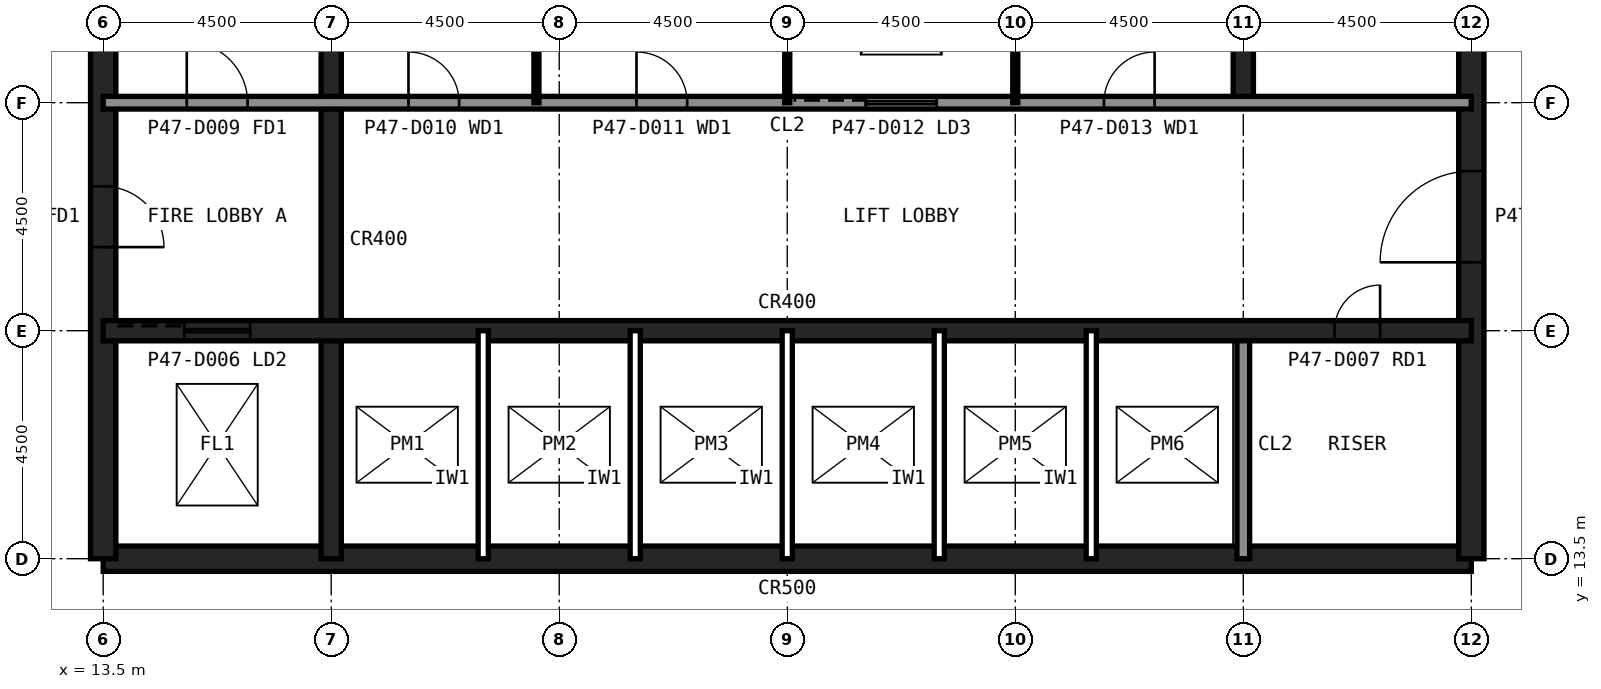
"""IFC4 building model, lengths in metres.
Left out: names, types, materials, properties, quantities, classifications, styles, units other than length and angle.
Written with IfcOpenShell. Run it as: python <this file> out.ifc"""

import sys

from ifc_helpers import new_model, si_unit, direction, frame, frame_2d, origin, place, context, subcontext, project, spatial, rectangle, extrude, element, fill, save


model = new_model("IFC4")
c1 = context("Model", 3, precision=1e-05, world=origin(), true_north=direction((0.0, 1.0)))
c2 = subcontext(c1, "Body", "Model", "MODEL_VIEW")
j1 = project(units=[si_unit("LENGTHUNIT", "METRE"), si_unit("PLANEANGLEUNIT", "RADIAN")], contexts=[c1])
p1 = place(None, origin())
s1 = spatial("IfcSite", under=j1, at=p1, CompositionType="ELEMENT")
p2 = place(p1, origin())
s2 = spatial("IfcBuilding", under=s1, at=p2, CompositionType="ELEMENT")
p3 = place(p2, frame((0.0, 0.0, 199.6)))
s3 = spatial("IfcBuildingStorey", under=s2, at=p3, CompositionType="ELEMENT", Elevation=199.6)
p4 = place(p3, frame((13.5, 13.5, 0.0), z_axis=(0.0, 0.0, 1.0), x_axis=(1.0, 0.0, 0.0)))
e1 = element("IfcWall", 1, at=p4, inside=s3, PredefinedType="SHEAR", context=c2, shape_type="SweptSolid", body=[
    extrude(rectangle(XDim=27.0, YDim=0.5, at=frame_2d((13.5, 0.0))), origin(), (0.0, 0.0, 1.0), 6.0),
])
p5 = place(p3, frame((40.5, 13.5, 0.0), z_axis=(0.0, 0.0, 1.0), x_axis=(0.0, 1.0, 0.0)))
e2 = element("IfcWall", 2, at=p5, inside=s3, PredefinedType="SHEAR", context=c2, shape_type="SweptSolid", body=[
    extrude(rectangle(XDim=27.0, YDim=0.5, at=frame_2d((13.5, 0.0))), origin(), (0.0, 0.0, 1.0), 6.0),
])
p6 = place(p5, frame((5.85, 0.0, 0.0)))
e3 = element("IfcOpeningElement", 3, at=p6, cuts=e2, PredefinedType="OPENING", context=c2, shape_type="SweptSolid", body=[
    extrude(rectangle(XDim=1.8, YDim=2.1, at=frame_2d((0.9, 1.05))), frame((0.0, 0.26, 0.0), z_axis=(0.0, -1.0, 0.0), x_axis=(1.0, 0.0, 0.0)), (0.0, 0.0, 1.0), 0.52),
])
p7 = place(p5, frame((19.65, 0.0, 0.0)))
e4 = element("IfcOpeningElement", 4, at=p7, cuts=e2, PredefinedType="OPENING", context=c2, shape_type="SweptSolid", body=[
    extrude(rectangle(XDim=1.2, YDim=2.1, at=frame_2d((0.6, 1.05))), frame((0.0, 0.26, 0.0), z_axis=(0.0, -1.0, 0.0), x_axis=(1.0, 0.0, 0.0)), (0.0, 0.0, 1.0), 0.52),
])
p8 = place(p3, frame((13.5, 40.5, 0.0), z_axis=(0.0, 0.0, 1.0), x_axis=(0.0, -1.0, 0.0)))
e5 = element("IfcWall", 5, at=p8, inside=s3, PredefinedType="SHEAR", context=c2, shape_type="SweptSolid", body=[
    extrude(rectangle(XDim=27.0, YDim=0.5, at=frame_2d((13.5, 0.0))), origin(), (0.0, 0.0, 1.0), 6.0),
])
p9 = place(p8, frame((19.65, 0.0, 0.0)))
e6 = element("IfcOpeningElement", 6, at=p9, cuts=e5, PredefinedType="OPENING", context=c2, shape_type="SweptSolid", body=[
    extrude(rectangle(XDim=1.2, YDim=2.1, at=frame_2d((0.6, 1.05))), frame((0.0, 0.26, 0.0), z_axis=(0.0, -1.0, 0.0), x_axis=(1.0, 0.0, 0.0)), (0.0, 0.0, 1.0), 0.52),
])
p10 = place(p8, frame((5.85, 0.0, 0.0)))
e7 = element("IfcOpeningElement", 7, at=p10, cuts=e5, PredefinedType="OPENING", context=c2, shape_type="SweptSolid", body=[
    extrude(rectangle(XDim=1.8, YDim=2.1, at=frame_2d((0.9, 1.05))), frame((0.0, 0.26, 0.0), z_axis=(0.0, -1.0, 0.0), x_axis=(1.0, 0.0, 0.0)), (0.0, 0.0, 1.0), 0.52),
])
p11 = place(p3, frame((18.0, 13.5, 0.0), z_axis=(0.0, 0.0, 1.0), x_axis=(0.0, 1.0, 0.0)))
e8 = element("IfcWall", 8, at=p11, inside=s3, PredefinedType="SHEAR", context=c2, shape_type="SweptSolid", body=[
    extrude(rectangle(XDim=18.0, YDim=0.4, at=frame_2d((9.0, 0.0))), origin(), (0.0, 0.0, 1.0), 6.0),
])
p12 = place(p3, frame((36.0, 13.5, 0.0), z_axis=(0.0, 0.0, 1.0), x_axis=(0.0, 1.0, 0.0)))
e9 = element("IfcWall", 9, at=p12, inside=s3, PredefinedType="SOLIDWALL", context=c2, shape_type="SweptSolid", body=[
    extrude(rectangle(XDim=4.5, YDim=0.25, at=frame_2d((2.25, 0.0))), origin(), (0.0, 0.0, 1.0), 5.82),
])
p13 = place(p3, frame((36.0, 22.5, 0.0), z_axis=(0.0, 0.0, 1.0), x_axis=(0.0, 1.0, 0.0)))
e10 = element("IfcWall", 10, at=p13, inside=s3, PredefinedType="SHEAR", context=c2, shape_type="SweptSolid", body=[
    extrude(rectangle(XDim=18.0, YDim=0.4, at=frame_2d((9.0, 0.0))), origin(), (0.0, 0.0, 1.0), 6.0),
])
p14 = place(p3, frame((13.5, 18.0, 0.0), z_axis=(0.0, 0.0, 1.0), x_axis=(1.0, 0.0, 0.0)))
e11 = element("IfcWall", 11, at=p14, inside=s3, PredefinedType="SHEAR", context=c2, shape_type="SweptSolid", body=[
    extrude(rectangle(XDim=27.0, YDim=0.4, at=frame_2d((13.5, 0.0))), origin(), (0.0, 0.0, 1.0), 6.0),
])
p15 = place(p14, frame((24.3, 0.0, 0.0)))
e12 = element("IfcOpeningElement", 12, at=p15, cuts=e11, PredefinedType="OPENING", context=c2, shape_type="SweptSolid", body=[
    extrude(rectangle(XDim=0.9, YDim=2.1, at=frame_2d((0.45, 1.05))), frame((0.0, 0.21, 0.0), z_axis=(0.0, -1.0, 0.0), x_axis=(1.0, 0.0, 0.0)), (0.0, 0.0, 1.0), 0.42),
])
p16 = place(p14, frame((1.6, 0.0, 0.0)))
e13 = element("IfcOpeningElement", 13, at=p16, cuts=e11, PredefinedType="OPENING", context=c2, shape_type="SweptSolid", body=[
    extrude(rectangle(XDim=1.3, YDim=2.2, at=frame_2d((0.65, 1.1))), frame((0.0, 0.21, 0.0), z_axis=(0.0, -1.0, 0.0), x_axis=(1.0, 0.0, 0.0)), (0.0, 0.0, 1.0), 0.42),
])
p17 = place(p3, frame((13.5, 22.5, 0.0), z_axis=(0.0, 0.0, 1.0), x_axis=(1.0, 0.0, 0.0)))
e14 = element("IfcWall", 14, at=p17, inside=s3, PredefinedType="SOLIDWALL", context=c2, shape_type="SweptSolid", body=[
    extrude(rectangle(XDim=27.0, YDim=0.25, at=frame_2d((13.5, 0.0))), origin(), (0.0, 0.0, 1.0), 5.82),
])
p18 = place(p17, frame((1.65, 0.0, 0.0)))
e15 = element("IfcOpeningElement", 15, at=p18, cuts=e14, PredefinedType="OPENING", context=c2, shape_type="SweptSolid", body=[
    extrude(rectangle(XDim=1.2, YDim=2.1, at=frame_2d((0.6, 1.05))), frame((0.0, 0.135, 0.0), z_axis=(0.0, -1.0, 0.0), x_axis=(1.0, 0.0, 0.0)), (0.0, 0.0, 1.0), 0.27),
])
p19 = place(p17, frame((6.025, 0.0, 0.0)))
e16 = element("IfcOpeningElement", 16, at=p19, cuts=e14, PredefinedType="OPENING", context=c2, shape_type="SweptSolid", body=[
    extrude(rectangle(XDim=1.0, YDim=2.1, at=frame_2d((0.5, 1.05))), frame((0.0, 0.135, 0.0), z_axis=(0.0, -1.0, 0.0), x_axis=(1.0, 0.0, 0.0)), (0.0, 0.0, 1.0), 0.27),
])
p20 = place(p17, frame((10.525, 0.0, 0.0)))
e17 = element("IfcOpeningElement", 17, at=p20, cuts=e14, PredefinedType="OPENING", context=c2, shape_type="SweptSolid", body=[
    extrude(rectangle(XDim=1.0, YDim=2.1, at=frame_2d((0.5, 1.05))), frame((0.0, 0.135, 0.0), z_axis=(0.0, -1.0, 0.0), x_axis=(1.0, 0.0, 0.0)), (0.0, 0.0, 1.0), 0.27),
])
p21 = place(p17, frame((19.75, 0.0, 0.0)))
e18 = element("IfcOpeningElement", 18, at=p21, cuts=e14, PredefinedType="OPENING", context=c2, shape_type="SweptSolid", body=[
    extrude(rectangle(XDim=1.0, YDim=2.1, at=frame_2d((0.5, 1.05))), frame((0.0, 0.135, 0.0), z_axis=(0.0, -1.0, 0.0), x_axis=(1.0, 0.0, 0.0)), (0.0, 0.0, 1.0), 0.27),
])
p22 = place(p17, frame((15.05, 0.0, 0.0)))
e19 = element("IfcOpeningElement", 19, at=p22, cuts=e14, PredefinedType="OPENING", context=c2, shape_type="SweptSolid", body=[
    extrude(rectangle(XDim=1.4, YDim=2.4, at=frame_2d((0.7, 1.2))), frame((0.0, 0.135, 0.0), z_axis=(0.0, -1.0, 0.0), x_axis=(1.0, 0.0, 0.0)), (0.0, 0.0, 1.0), 0.27),
])
p23 = place(p3, frame((17.739, -0.63, 0.0), z_axis=(0.0, 0.0, 1.0), x_axis=(-0.707106781187, 0.707106781187, 0.0)))
e20 = element("IfcWall", 20, at=p23, inside=s3, PredefinedType="SOLIDWALL", context=c2, shape_type="SweptSolid", body=[
    extrude(rectangle(XDim=25.978, YDim=0.3, at=frame_2d((12.989, 0.0))), origin(), (0.0, 0.0, 1.0), 6.0),
])
p24 = place(p23, frame((0.424, 0.0, 1.2)))
e21 = element("IfcOpeningElement", 21, at=p24, cuts=e20, PredefinedType="OPENING", context=c2, shape_type="SweptSolid", body=[
    extrude(rectangle(XDim=2.4, YDim=3.0, at=frame_2d((1.2, 1.5))), frame((0.0, 0.16, 0.0), z_axis=(0.0, -1.0, 0.0), x_axis=(1.0, 0.0, 0.0)), (0.0, 0.0, 1.0), 0.32),
])
p25 = place(p23, frame((3.671, 0.0, 1.2)))
e22 = element("IfcOpeningElement", 22, at=p25, cuts=e20, PredefinedType="OPENING", context=c2, shape_type="SweptSolid", body=[
    extrude(rectangle(XDim=2.4, YDim=3.0, at=frame_2d((1.2, 1.5))), frame((0.0, 0.16, 0.0), z_axis=(0.0, -1.0, 0.0), x_axis=(1.0, 0.0, 0.0)), (0.0, 0.0, 1.0), 0.32),
])
p26 = place(p23, frame((6.918, 0.0, 1.2)))
e23 = element("IfcOpeningElement", 23, at=p26, cuts=e20, PredefinedType="OPENING", context=c2, shape_type="SweptSolid", body=[
    extrude(rectangle(XDim=2.4, YDim=3.0, at=frame_2d((1.2, 1.5))), frame((0.0, 0.16, 0.0), z_axis=(0.0, -1.0, 0.0), x_axis=(1.0, 0.0, 0.0)), (0.0, 0.0, 1.0), 0.32),
])
p27 = place(p23, frame((10.165, 0.0, 1.2)))
e24 = element("IfcOpeningElement", 24, at=p27, cuts=e20, PredefinedType="OPENING", context=c2, shape_type="SweptSolid", body=[
    extrude(rectangle(XDim=2.4, YDim=3.0, at=frame_2d((1.2, 1.5))), frame((0.0, 0.16, 0.0), z_axis=(0.0, -1.0, 0.0), x_axis=(1.0, 0.0, 0.0)), (0.0, 0.0, 1.0), 0.32),
])
p28 = place(p23, frame((13.412, 0.0, 1.2)))
e25 = element("IfcOpeningElement", 25, at=p28, cuts=e20, PredefinedType="OPENING", context=c2, shape_type="SweptSolid", body=[
    extrude(rectangle(XDim=2.4, YDim=3.0, at=frame_2d((1.2, 1.5))), frame((0.0, 0.16, 0.0), z_axis=(0.0, -1.0, 0.0), x_axis=(1.0, 0.0, 0.0)), (0.0, 0.0, 1.0), 0.32),
])
p29 = place(p23, frame((16.66, 0.0, 1.2)))
e26 = element("IfcOpeningElement", 26, at=p29, cuts=e20, PredefinedType="OPENING", context=c2, shape_type="SweptSolid", body=[
    extrude(rectangle(XDim=2.4, YDim=3.0, at=frame_2d((1.2, 1.5))), frame((0.0, 0.16, 0.0), z_axis=(0.0, -1.0, 0.0), x_axis=(1.0, 0.0, 0.0)), (0.0, 0.0, 1.0), 0.32),
])
p30 = place(p23, frame((19.907, 0.0, 1.2)))
e27 = element("IfcOpeningElement", 27, at=p30, cuts=e20, PredefinedType="OPENING", context=c2, shape_type="SweptSolid", body=[
    extrude(rectangle(XDim=2.4, YDim=3.0, at=frame_2d((1.2, 1.5))), frame((0.0, 0.16, 0.0), z_axis=(0.0, -1.0, 0.0), x_axis=(1.0, 0.0, 0.0)), (0.0, 0.0, 1.0), 0.32),
])
p31 = place(p23, frame((23.154, 0.0, 1.2)))
e28 = element("IfcOpeningElement", 28, at=p31, cuts=e20, PredefinedType="OPENING", context=c2, shape_type="SweptSolid", body=[
    extrude(rectangle(XDim=2.4, YDim=3.0, at=frame_2d((1.2, 1.5))), frame((0.0, 0.16, 0.0), z_axis=(0.0, -1.0, 0.0), x_axis=(1.0, 0.0, 0.0)), (0.0, 0.0, 1.0), 0.32),
])
for number, where, z_axis, x_axis in (
    (29, (21.0, 13.5, 0.0), (0.0, 0.0, 1.0), (0.0, 1.0, 0.0)),
    (30, (24.0, 13.5, 0.0), (0.0, 0.0, 1.0), (0.0, 1.0, 0.0)),
    (31, (27.0, 13.5, 0.0), (0.0, 0.0, 1.0), (0.0, 1.0, 0.0)),
    (32, (30.0, 13.5, 0.0), (0.0, 0.0, 1.0), (0.0, 1.0, 0.0)),
    (33, (33.0, 13.5, 0.0), (0.0, 0.0, 1.0), (0.0, 1.0, 0.0)),
):
    element("IfcWall", number, at=place(p3, frame(where, z_axis=z_axis, x_axis=x_axis)), inside=s3, PredefinedType="PARTITIONING", context=c2, shape_type="SweptSolid", body=[
        extrude(rectangle(XDim=4.5, YDim=0.2, at=frame_2d((2.25, 0.0))), origin(), (0.0, 0.0, 1.0), 5.82),
    ])
for number, where, z_axis, x_axis in (
    (34, (22.05, 22.5, 0.0), (0.0, 0.0, 1.0), (0.0, 1.0, 0.0)),
    (35, (27.0, 22.5, 0.0), (0.0, 0.0, 1.0), (0.0, 1.0, 0.0)),
    (36, (31.5, 22.5, 0.0), (0.0, 0.0, 1.0), (0.0, 1.0, 0.0)),
):
    element("IfcWall", number, at=place(p3, frame(where, z_axis=z_axis, x_axis=x_axis)), inside=s3, PredefinedType="PLUMBINGWALL", context=c2, shape_type="SweptSolid", body=[
        extrude(rectangle(XDim=9.0, YDim=0.1, at=frame_2d((4.5, 0.0))), origin(), (0.0, 0.0, 1.0), 5.82),
    ])
p32 = place(p9, origin())
e37 = element("IfcDoor", 37, at=p32, inside=s3, OperationType="SINGLE_SWING_RIGHT", PredefinedType="DOOR", context=c2, shape_type="SweptSolid", body=[
    extrude(rectangle(XDim=1.2, YDim=2.1, at=frame_2d((0.6, 1.05))), frame((0.0, 0.025, 0.0), z_axis=(0.0, -1.0, 0.0), x_axis=(1.0, 0.0, 0.0)), (0.0, 0.0, 1.0), 0.05),
])
fill(e6, e37)
p33 = place(p6, origin())
e38 = element("IfcDoor", 38, at=p33, inside=s3, OperationType="SINGLE_SWING_LEFT", PredefinedType="DOOR", context=c2, shape_type="SweptSolid", body=[
    extrude(rectangle(XDim=1.8, YDim=2.1, at=frame_2d((0.9, 1.05))), frame((0.0, 0.025, 0.0), z_axis=(0.0, -1.0, 0.0), x_axis=(1.0, 0.0, 0.0)), (0.0, 0.0, 1.0), 0.05),
])
fill(e3, e38)
p34 = place(p18, origin())
e39 = element("IfcDoor", 39, at=p34, inside=s3, OperationType="SINGLE_SWING_LEFT", PredefinedType="DOOR", context=c2, shape_type="SweptSolid", body=[
    extrude(rectangle(XDim=1.2, YDim=2.1, at=frame_2d((0.6, 1.05))), frame((0.0, 0.025, 0.0), z_axis=(0.0, -1.0, 0.0), x_axis=(1.0, 0.0, 0.0)), (0.0, 0.0, 1.0), 0.05),
])
fill(e15, e39)
p35 = place(p19, origin())
e40 = element("IfcDoor", 40, at=p35, inside=s3, OperationType="SINGLE_SWING_LEFT", PredefinedType="DOOR", context=c2, shape_type="SweptSolid", body=[
    extrude(rectangle(XDim=1.0, YDim=2.1, at=frame_2d((0.5, 1.05))), frame((0.0, 0.025, 0.0), z_axis=(0.0, -1.0, 0.0), x_axis=(1.0, 0.0, 0.0)), (0.0, 0.0, 1.0), 0.05),
])
fill(e16, e40)
p36 = place(p20, origin())
e41 = element("IfcDoor", 41, at=p36, inside=s3, OperationType="SINGLE_SWING_LEFT", PredefinedType="DOOR", context=c2, shape_type="SweptSolid", body=[
    extrude(rectangle(XDim=1.0, YDim=2.1, at=frame_2d((0.5, 1.05))), frame((0.0, 0.025, 0.0), z_axis=(0.0, -1.0, 0.0), x_axis=(1.0, 0.0, 0.0)), (0.0, 0.0, 1.0), 0.05),
])
fill(e17, e41)
p37 = place(p21, origin())
e42 = element("IfcDoor", 42, at=p37, inside=s3, OperationType="SINGLE_SWING_RIGHT", PredefinedType="DOOR", context=c2, shape_type="SweptSolid", body=[
    extrude(rectangle(XDim=1.0, YDim=2.1, at=frame_2d((0.5, 1.05))), frame((0.0, 0.025, 0.0), z_axis=(0.0, -1.0, 0.0), x_axis=(1.0, 0.0, 0.0)), (0.0, 0.0, 1.0), 0.05),
])
fill(e18, e42)
p38 = place(p15, origin())
e43 = element("IfcDoor", 43, at=p38, inside=s3, OperationType="SINGLE_SWING_RIGHT", PredefinedType="DOOR", context=c2, shape_type="SweptSolid", body=[
    extrude(rectangle(XDim=0.9, YDim=2.1, at=frame_2d((0.45, 1.05))), frame((0.0, 0.025, 0.0), z_axis=(0.0, -1.0, 0.0), x_axis=(1.0, 0.0, 0.0)), (0.0, 0.0, 1.0), 0.05),
])
fill(e12, e43)
p39 = place(p16, origin())
e44 = element("IfcDoor", 44, at=p39, inside=s3, OperationType="SLIDING_TO_LEFT", PredefinedType="DOOR", context=c2, shape_type="SweptSolid", body=[
    extrude(rectangle(XDim=1.3, YDim=2.2, at=frame_2d((0.65, 1.1))), frame((0.0, 0.025, 0.0), z_axis=(0.0, -1.0, 0.0), x_axis=(1.0, 0.0, 0.0)), (0.0, 0.0, 1.0), 0.05),
])
fill(e13, e44)
p40 = place(p22, origin())
e45 = element("IfcDoor", 45, at=p40, inside=s3, OperationType="SLIDING_TO_LEFT", PredefinedType="DOOR", context=c2, shape_type="SweptSolid", body=[
    extrude(rectangle(XDim=1.4, YDim=2.4, at=frame_2d((0.7, 1.2))), frame((0.0, 0.025, 0.0), z_axis=(0.0, -1.0, 0.0), x_axis=(1.0, 0.0, 0.0)), (0.0, 0.0, 1.0), 0.05),
])
fill(e19, e45)
save(model, sys.argv[1])
